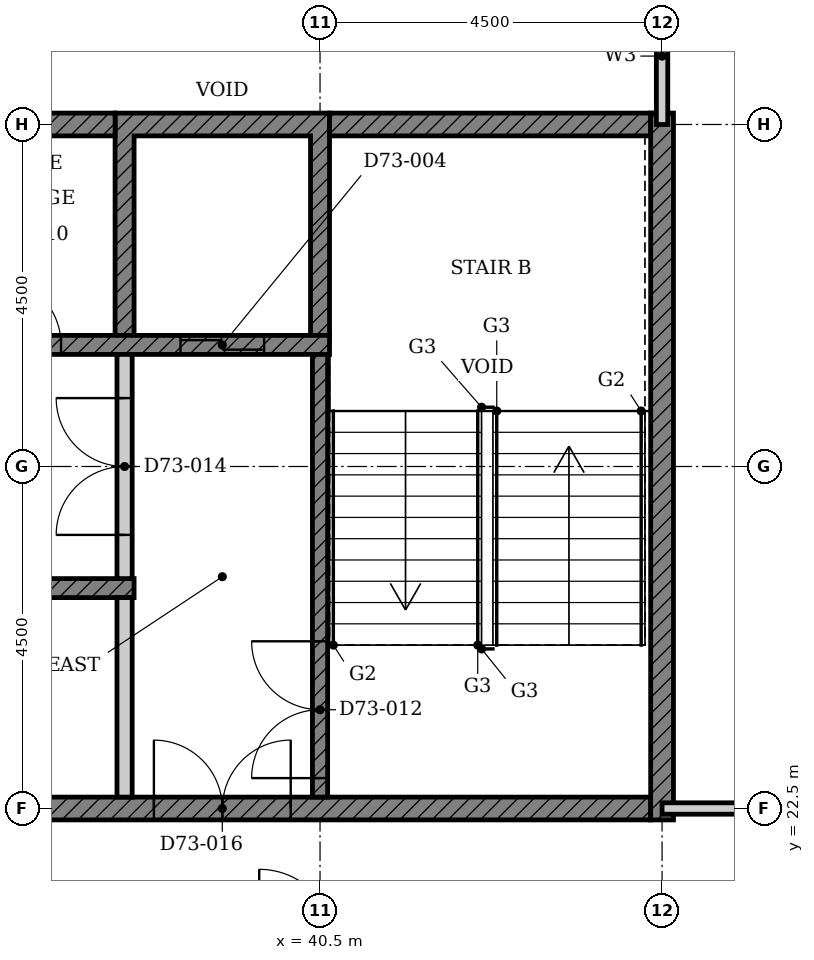
"""IFC4 building model, lengths in metres.
Left out: names, types, materials, properties, quantities, classifications, styles, units other than length and angle.
Written with IfcOpenShell. Run it as: python <this file> out.ifc"""

import sys

from ifc_helpers import new_model, si_unit, direction, frame, frame_2d, origin, place, context, subcontext, project, spatial, polyline, rectangle, outline, extrude, element, fill, save


model = new_model("IFC4")
c1 = context("Model", 3, precision=1e-05, world=origin(), true_north=direction((0.0, 1.0)))
c2 = subcontext(c1, "Body", "Model", "MODEL_VIEW")
j1 = project(units=[si_unit("LENGTHUNIT", "METRE"), si_unit("PLANEANGLEUNIT", "RADIAN")], contexts=[c1])
p1 = place(None, origin())
s1 = spatial("IfcSite", under=j1, at=p1, CompositionType="ELEMENT")
p2 = place(p1, origin())
s2 = spatial("IfcBuilding", under=s1, at=p2, CompositionType="ELEMENT")
p3 = place(p2, frame((0.0, 0.0, 287.1)))
s3 = spatial("IfcBuildingStorey", under=s2, at=p3, CompositionType="ELEMENT", Elevation=287.1)
p4 = place(p3, origin())
e1 = element("IfcWall", 1, at=p4, inside=s3, PredefinedType="SHEAR", context=c2, shape_type="SweptSolid", body=[
    extrude(outline(polyline([(37.803, 28.725), (38.053, 28.725), (38.053, 31.35), (40.375, 31.35), (40.375, 28.725), (40.625, 28.725), (40.625, 31.65), (37.803, 31.65), (37.803, 28.725)])), origin(), (0.0, 0.0, 1.0), 3.4),
])
p5 = place(p3, frame((30.339, 22.5, 0.0), z_axis=(0.0, 0.0, 1.0), x_axis=(1.0, 0.0, 0.0)))
e2 = element("IfcWall", 2, at=p5, inside=s3, PredefinedType="SHEAR", context=c2, shape_type="SweptSolid", body=[
    extrude(rectangle(XDim=14.511, YDim=0.3, at=frame_2d((7.255, 0.0))), origin(), (0.0, 0.0, 1.0), 3.4),
])
p6 = place(p5, frame((7.975, 0.0, 0.0)))
e3 = element("IfcOpeningElement", 3, at=p6, cuts=e2, PredefinedType="OPENING", context=c2, shape_type="SweptSolid", body=[
    extrude(rectangle(XDim=1.8, YDim=2.1, at=frame_2d((0.9, 1.05))), frame((0.0, 0.16, 0.0), z_axis=(0.0, -1.0, 0.0), x_axis=(1.0, 0.0, 0.0)), (0.0, 0.0, 1.0), 0.32),
])
p7 = place(p3, frame((30.339, 31.5, 0.0), z_axis=(0.0, 0.0, 1.0), x_axis=(1.0, 0.0, 0.0)))
e4 = element("IfcWall", 4, at=p7, inside=s3, PredefinedType="SHEAR", context=c2, shape_type="SweptSolid", body=[
    extrude(rectangle(XDim=7.464, YDim=0.3, at=frame_2d((3.732, 0.0))), origin(), (0.0, 0.0, 1.0), 3.4),
])
p8 = place(p3, frame((40.625, 31.5, 0.0), z_axis=(0.0, 0.0, 1.0), x_axis=(1.0, 0.0, 0.0)))
e5 = element("IfcWall", 5, at=p8, inside=s3, PredefinedType="SHEAR", context=c2, shape_type="SweptSolid", body=[
    extrude(rectangle(XDim=4.225, YDim=0.3, at=frame_2d((2.113, 0.0))), origin(), (0.0, 0.0, 1.0), 3.4),
])
p9 = place(p3, frame((45.0, 22.35, 0.0), z_axis=(0.0, 0.0, 1.0), x_axis=(0.0, 1.0, 0.0)))
e6 = element("IfcWall", 6, at=p9, inside=s3, PredefinedType="SHEAR", context=c2, shape_type="SweptSolid", body=[
    extrude(rectangle(XDim=9.3, YDim=0.3, at=frame_2d((4.65, 0.0))), origin(), (0.0, 0.0, 1.0), 3.4),
])
p10 = place(p3, frame((22.375, 25.4, 0.0), z_axis=(0.0, 0.0, 1.0), x_axis=(1.0, 0.0, 0.0)))
e7 = element("IfcWall", 7, at=p10, inside=s3, PredefinedType="SHEAR", context=c2, shape_type="SweptSolid", body=[
    extrude(rectangle(XDim=15.678, YDim=0.25, at=frame_2d((7.839, 0.0))), origin(), (0.0, 0.0, 1.0), 3.4),
])
p11 = place(p10, frame((6.004, 0.0, 0.0)))
e8 = element("IfcOpeningElement", 8, at=p11, cuts=e7, PredefinedType="OPENING", context=c2, shape_type="SweptSolid", body=[
    extrude(rectangle(XDim=1.1, YDim=2.1, at=frame_2d((0.55, 1.05))), frame((0.0, 0.135, 0.0), z_axis=(0.0, -1.0, 0.0), x_axis=(1.0, 0.0, 0.0)), (0.0, 0.0, 1.0), 0.27),
])
p12 = place(p10, frame((0.861, 0.0, 0.0)))
e9 = element("IfcOpeningElement", 9, at=p12, cuts=e7, PredefinedType="OPENING", context=c2, shape_type="SweptSolid", body=[
    extrude(rectangle(XDim=1.1, YDim=2.1, at=frame_2d((0.55, 1.05))), frame((0.0, 0.135, 0.0), z_axis=(0.0, -1.0, 0.0), x_axis=(1.0, 0.0, 0.0)), (0.0, 0.0, 1.0), 0.27),
])
p13 = place(p10, frame((3.532, 0.0, 0.0)))
e10 = element("IfcOpeningElement", 10, at=p13, cuts=e7, PredefinedType="OPENING", context=c2, shape_type="SweptSolid", body=[
    extrude(rectangle(XDim=0.9, YDim=2.1, at=frame_2d((0.45, 1.05))), frame((0.0, 0.135, 0.0), z_axis=(0.0, -1.0, 0.0), x_axis=(1.0, 0.0, 0.0)), (0.0, 0.0, 1.0), 0.27),
])
p14 = place(p10, frame((8.675, 0.0, 0.0)))
e11 = element("IfcOpeningElement", 11, at=p14, cuts=e7, PredefinedType="OPENING", context=c2, shape_type="SweptSolid", body=[
    extrude(rectangle(XDim=0.9, YDim=2.1, at=frame_2d((0.45, 1.05))), frame((0.0, 0.135, 0.0), z_axis=(0.0, -1.0, 0.0), x_axis=(1.0, 0.0, 0.0)), (0.0, 0.0, 1.0), 0.27),
])
p15 = place(p10, frame((12.532, 0.0, 0.0)))
e12 = element("IfcOpeningElement", 12, at=p15, cuts=e7, PredefinedType="OPENING", context=c2, shape_type="SweptSolid", body=[
    extrude(rectangle(XDim=0.9, YDim=2.1, at=frame_2d((0.45, 1.05))), frame((0.0, 0.135, 0.0), z_axis=(0.0, -1.0, 0.0), x_axis=(1.0, 0.0, 0.0)), (0.0, 0.0, 1.0), 0.27),
])
p16 = place(p3, frame((24.947, 28.6, 0.0), z_axis=(0.0, 0.0, 1.0), x_axis=(1.0, 0.0, 0.0)))
e13 = element("IfcWall", 13, at=p16, inside=s3, PredefinedType="SHEAR", context=c2, shape_type="SweptSolid", body=[
    extrude(rectangle(XDim=15.678, YDim=0.25, at=frame_2d((7.839, 0.0))), origin(), (0.0, 0.0, 1.0), 3.4),
])
p17 = place(p16, frame((3.432, 0.0, 0.0)))
e14 = element("IfcOpeningElement", 14, at=p17, cuts=e13, PredefinedType="OPENING", context=c2, shape_type="SweptSolid", body=[
    extrude(rectangle(XDim=1.1, YDim=2.1, at=frame_2d((0.55, 1.05))), frame((0.0, 0.135, 0.0), z_axis=(0.0, -1.0, 0.0), x_axis=(1.0, 0.0, 0.0)), (0.0, 0.0, 1.0), 0.27),
])
p18 = place(p16, frame((13.718, 0.0, 0.0)))
e15 = element("IfcOpeningElement", 15, at=p18, cuts=e13, PredefinedType="OPENING", context=c2, shape_type="SweptSolid", body=[
    extrude(rectangle(XDim=1.1, YDim=2.1, at=frame_2d((0.55, 1.05))), frame((0.0, 0.135, 0.0), z_axis=(0.0, -1.0, 0.0), x_axis=(1.0, 0.0, 0.0)), (0.0, 0.0, 1.0), 0.27),
])
p19 = place(p16, frame((0.961, 0.0, 0.0)))
e16 = element("IfcOpeningElement", 16, at=p19, cuts=e13, PredefinedType="OPENING", context=c2, shape_type="SweptSolid", body=[
    extrude(rectangle(XDim=0.9, YDim=2.1, at=frame_2d((0.45, 1.05))), frame((0.0, 0.135, 0.0), z_axis=(0.0, -1.0, 0.0), x_axis=(1.0, 0.0, 0.0)), (0.0, 0.0, 1.0), 0.27),
])
p20 = place(p16, frame((7.389, 0.0, 0.0)))
e17 = element("IfcOpeningElement", 17, at=p20, cuts=e13, PredefinedType="OPENING", context=c2, shape_type="SweptSolid", body=[
    extrude(rectangle(XDim=0.9, YDim=2.1, at=frame_2d((0.45, 1.05))), frame((0.0, 0.135, 0.0), z_axis=(0.0, -1.0, 0.0), x_axis=(1.0, 0.0, 0.0)), (0.0, 0.0, 1.0), 0.27),
])
p21 = place(p16, frame((11.246, 0.0, 0.0)))
e18 = element("IfcOpeningElement", 18, at=p21, cuts=e13, PredefinedType="OPENING", context=c2, shape_type="SweptSolid", body=[
    extrude(rectangle(XDim=0.9, YDim=2.1, at=frame_2d((0.45, 1.05))), frame((0.0, 0.135, 0.0), z_axis=(0.0, -1.0, 0.0), x_axis=(1.0, 0.0, 0.0)), (0.0, 0.0, 1.0), 0.27),
])
p22 = place(p3, frame((37.928, 22.65, 0.0), z_axis=(0.0, 0.0, 1.0), x_axis=(0.0, 1.0, 0.0)))
e19 = element("IfcWall", 19, at=p22, inside=s3, PredefinedType="PARTITIONING", context=c2, shape_type="SweptSolid", body=[
    extrude(rectangle(XDim=2.625, YDim=0.2, at=frame_2d((1.312, 0.0))), origin(), (0.0, 0.0, 1.0), 3.4),
])
p23 = place(p3, frame((40.5, 22.65, 0.0), z_axis=(0.0, 0.0, 1.0), x_axis=(0.0, 1.0, 0.0)))
e20 = element("IfcWall", 20, at=p23, inside=s3, PredefinedType="SHEAR", context=c2, shape_type="SweptSolid", body=[
    extrude(rectangle(XDim=5.825, YDim=0.2, at=frame_2d((2.913, 0.0))), origin(), (0.0, 0.0, 1.0), 3.4),
])
p24 = place(p23, frame((0.25, 0.0, 0.0)))
e21 = element("IfcOpeningElement", 21, at=p24, cuts=e20, PredefinedType="OPENING", context=c2, shape_type="SweptSolid", body=[
    extrude(rectangle(XDim=1.8, YDim=2.1, at=frame_2d((0.9, 1.05))), frame((0.0, 0.11, 0.0), z_axis=(0.0, -1.0, 0.0), x_axis=(1.0, 0.0, 0.0)), (0.0, 0.0, 1.0), 0.22),
])
p25 = place(p3, frame((37.928, 25.525, 0.0), z_axis=(0.0, 0.0, 1.0), x_axis=(0.0, 1.0, 0.0)))
e22 = element("IfcWall", 22, at=p25, inside=s3, PredefinedType="PARTITIONING", context=c2, shape_type="SweptSolid", body=[
    extrude(rectangle(XDim=2.95, YDim=0.2, at=frame_2d((1.475, 0.0))), origin(), (0.0, 0.0, 1.0), 3.4),
])
p26 = place(p25, frame((0.575, 0.0, 0.0)))
e23 = element("IfcOpeningElement", 23, at=p26, cuts=e22, PredefinedType="OPENING", context=c2, shape_type="SweptSolid", body=[
    extrude(rectangle(XDim=1.8, YDim=2.1, at=frame_2d((0.9, 1.05))), frame((0.0, 0.11, 0.0), z_axis=(0.0, -1.0, 0.0), x_axis=(1.0, 0.0, 0.0)), (0.0, 0.0, 1.0), 0.22),
])
p27 = place(p3, frame((45.0, 22.5, 0.0), z_axis=(0.0, 0.0, 1.0), x_axis=(1.0, 0.0, 0.0)))
e24 = element("IfcWall", 24, at=p27, inside=s3, PredefinedType="PARTITIONING", context=c2, shape_type="SweptSolid", body=[
    extrude(rectangle(XDim=4.74, YDim=0.15, at=frame_2d((2.37, 0.0))), origin(), (0.0, 0.0, 1.0), 3.4),
])
p28 = place(p27, frame((1.75, 0.0, 0.0)))
e25 = element("IfcOpeningElement", 25, at=p28, cuts=e24, PredefinedType="OPENING", context=c2, shape_type="SweptSolid", body=[
    extrude(rectangle(XDim=1.0, YDim=2.2, at=frame_2d((0.5, 1.1))), frame((0.0, 0.085, 0.0), z_axis=(0.0, -1.0, 0.0), x_axis=(1.0, 0.0, 0.0)), (0.0, 0.0, 1.0), 0.17),
])
p29 = place(p3, frame((45.0, 31.5, 0.0), z_axis=(0.0, 0.0, 1.0), x_axis=(0.0, 1.0, 0.0)))
e26 = element("IfcWall", 26, at=p29, inside=s3, PredefinedType="PARTITIONING", context=c2, shape_type="SweptSolid", body=[
    extrude(rectangle(XDim=1.8, YDim=0.15, at=frame_2d((0.9, 0.0))), origin(), (0.0, 0.0, 1.0), 3.4),
])
p30 = place(p18, origin())
e27 = element("IfcDoor", 27, at=p30, inside=s3, OperationType="DOUBLE_DOOR_SLIDING", PredefinedType="DOOR", context=c2, shape_type="SweptSolid", body=[
    extrude(rectangle(XDim=1.1, YDim=2.1, at=frame_2d((0.55, 1.05))), frame((0.0, 0.025, 0.0), z_axis=(0.0, -1.0, 0.0), x_axis=(1.0, 0.0, 0.0)), (0.0, 0.0, 1.0), 0.05),
])
fill(e15, e27)
p31 = place(p21, origin())
e28 = element("IfcDoor", 28, at=p31, inside=s3, OperationType="SINGLE_SWING_LEFT", PredefinedType="DOOR", context=c2, shape_type="SweptSolid", body=[
    extrude(rectangle(XDim=0.9, YDim=2.1, at=frame_2d((0.45, 1.05))), frame((0.0, 0.025, 0.0), z_axis=(0.0, -1.0, 0.0), x_axis=(1.0, 0.0, 0.0)), (0.0, 0.0, 1.0), 0.05),
])
fill(e18, e28)
p32 = place(p24, origin())
e29 = element("IfcDoor", 29, at=p32, inside=s3, OperationType="DOUBLE_DOOR_SINGLE_SWING", PredefinedType="DOOR", context=c2, shape_type="SweptSolid", body=[
    extrude(rectangle(XDim=1.8, YDim=2.1, at=frame_2d((0.9, 1.05))), frame((0.0, 0.025, 0.0), z_axis=(0.0, -1.0, 0.0), x_axis=(1.0, 0.0, 0.0)), (0.0, 0.0, 1.0), 0.05),
])
fill(e21, e29)
p33 = place(p26, origin())
e30 = element("IfcDoor", 30, at=p33, inside=s3, OperationType="DOUBLE_DOOR_SINGLE_SWING", PredefinedType="DOOR", context=c2, shape_type="SweptSolid", body=[
    extrude(rectangle(XDim=1.8, YDim=2.1, at=frame_2d((0.9, 1.05))), frame((0.0, 0.025, 0.0), z_axis=(0.0, -1.0, 0.0), x_axis=(1.0, 0.0, 0.0)), (0.0, 0.0, 1.0), 0.05),
])
fill(e23, e30)
p34 = place(p6, origin())
e31 = element("IfcDoor", 31, at=p34, inside=s3, OperationType="DOUBLE_DOOR_SINGLE_SWING", PredefinedType="DOOR", context=c2, shape_type="SweptSolid", body=[
    extrude(rectangle(XDim=1.8, YDim=2.1, at=frame_2d((0.9, 1.05))), frame((0.0, 0.025, 0.0), z_axis=(0.0, -1.0, 0.0), x_axis=(1.0, 0.0, 0.0)), (0.0, 0.0, 1.0), 0.05),
])
fill(e3, e31)
save(model, sys.argv[1])
